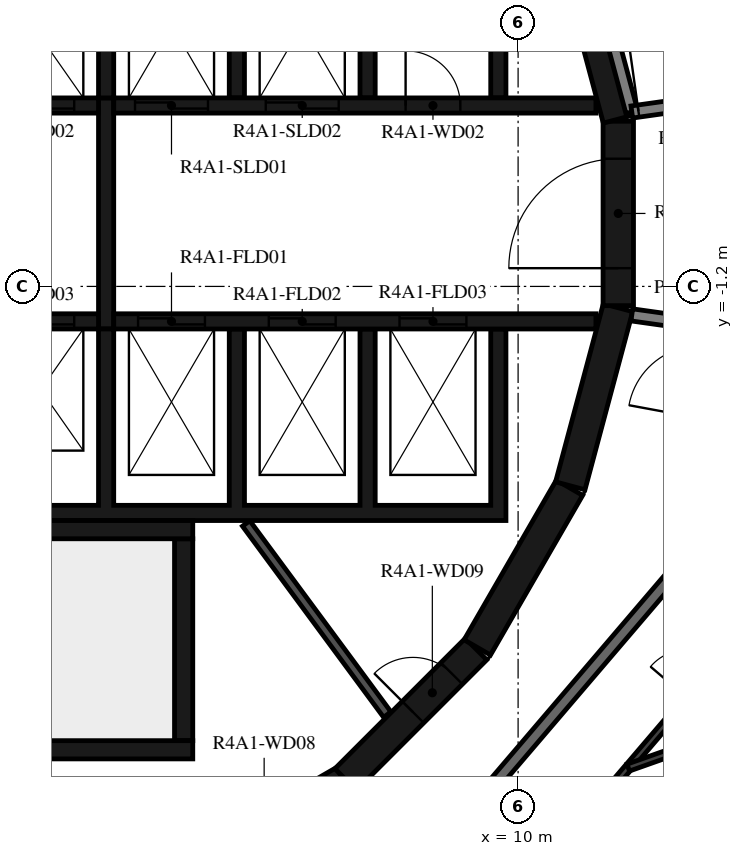
"""IFC4 building model, lengths in metres.
Left out: names, types, materials, properties, quantities, classifications, styles, units other than length and angle.
Written with IfcOpenShell. Run it as: python <this file> out.ifc"""

import sys

from ifc_helpers import new_model, si_unit, direction, frame, frame_2d, origin, place, context, subcontext, project, spatial, polyline, rectangle, outline, extrude, element, fill, save


model = new_model("IFC4")
c1 = context("Model", 3, precision=1e-05, world=origin(), true_north=direction((0.0, 1.0)))
c2 = subcontext(c1, "Body", "Model", "MODEL_VIEW")
j1 = project(units=[si_unit("LENGTHUNIT", "METRE"), si_unit("PLANEANGLEUNIT", "RADIAN")], contexts=[c1])
p1 = place(None, origin())
s1 = spatial("IfcSite", under=j1, at=p1, CompositionType="ELEMENT")
p2 = place(p1, origin())
s2 = spatial("IfcBuilding", under=s1, at=p2, CompositionType="ELEMENT")
p3 = place(p2, frame((0.0, 0.0, 155.2)))
s3 = spatial("IfcBuildingStorey", under=s2, at=p3, CompositionType="ELEMENT", Elevation=155.2)
p4 = place(p3, frame((4.51, -10.845, 0.0), z_axis=(0.0, 0.0, 1.0), x_axis=(0.865975092491, 0.500087131594, 0.0)))
e1 = element("IfcWall", 1, at=p4, inside=s3, PredefinedType="SHEAR", context=c2, shape_type="SweptSolid", body=[
    extrude(rectangle(XDim=3.033, YDim=0.5, at=frame_2d((1.516, 0.0))), origin(), (0.0, 0.0, 1.0), 3.12),
])
p5 = place(p4, frame((1.066, 0.0, 0.0)))
e2 = element("IfcOpeningElement", 2, at=p5, cuts=e1, PredefinedType="OPENING", context=c2, shape_type="SweptSolid", body=[
    extrude(rectangle(XDim=0.9, YDim=2.1, at=frame_2d((0.45, 1.05))), frame((0.0, 0.26, 0.0), z_axis=(0.0, -1.0, 0.0), x_axis=(1.0, 0.0, 0.0)), (0.0, 0.0, 1.0), 0.52),
])
p6 = place(p3, frame((7.164, -9.308, 0.0), z_axis=(0.0, 0.0, 1.0), x_axis=(0.707106781187, 0.707106781187, 0.0)))
e3 = element("IfcWall", 3, at=p6, inside=s3, PredefinedType="SHEAR", context=c2, shape_type="SweptSolid", body=[
    extrude(rectangle(XDim=3.032, YDim=0.5, at=frame_2d((1.516, 0.0))), origin(), (0.0, 0.0, 1.0), 3.12),
])
p7 = place(p6, frame((1.566, 0.0, 0.0)))
e4 = element("IfcOpeningElement", 4, at=p7, cuts=e3, PredefinedType="OPENING", context=c2, shape_type="SweptSolid", body=[
    extrude(rectangle(XDim=0.9, YDim=2.1, at=frame_2d((0.45, 1.05))), frame((0.0, 0.26, 0.0), z_axis=(0.0, -1.0, 0.0), x_axis=(1.0, 0.0, 0.0)), (0.0, 0.0, 1.0), 0.52),
])
for number, where, z_axis, x_axis in (
    (5, (9.329, -7.137, 0.0), (0.0, 0.0, 1.0), (0.5, 0.866, 0.0)),
    (6, (10.858, -4.479, 0.0), (0.0, 0.0, 1.0), (0.259, 0.966, 0.0)),
):
    element("IfcWall", number, at=place(p3, frame(where, z_axis=z_axis, x_axis=x_axis)), inside=s3, PredefinedType="SHEAR", context=c2, shape_type="SweptSolid", body=[
        extrude(rectangle(XDim=3.033, YDim=0.5, at=frame_2d((1.516, 0.0))), origin(), (0.0, 0.0, 1.0), 3.12),
    ])
p8 = place(p3, frame((11.647, -1.516, 0.0), z_axis=(0.0, 0.0, 1.0), x_axis=(0.0, 1.0, 0.0)))
e7 = element("IfcWall", 7, at=p8, inside=s3, PredefinedType="SHEAR", context=c2, shape_type="SweptSolid", body=[
    extrude(rectangle(XDim=3.033, YDim=0.5, at=frame_2d((1.516, 0.0))), origin(), (0.0, 0.0, 1.0), 3.12),
])
p9 = place(p8, frame((0.616, 0.0, 0.0)))
e8 = element("IfcOpeningElement", 8, at=p9, cuts=e7, PredefinedType="OPENING", context=c2, shape_type="SweptSolid", body=[
    extrude(rectangle(XDim=1.8, YDim=2.1, at=frame_2d((0.9, 1.05))), frame((0.0, 0.26, 0.0), z_axis=(0.0, -1.0, 0.0), x_axis=(1.0, 0.0, 0.0)), (0.0, 0.0, 1.0), 0.52),
])
p10 = place(p3, frame((11.643, 1.55, 0.0), z_axis=(0.0, 0.0, 1.0), x_axis=(-0.258734743916, 0.965948410781, 0.0)))
e9 = element("IfcWall", 9, at=p10, inside=s3, PredefinedType="SHEAR", context=c2, shape_type="SweptSolid", body=[
    extrude(rectangle(XDim=3.033, YDim=0.5, at=frame_2d((1.516, 0.0))), origin(), (0.0, 0.0, 1.0), 3.12),
])
p11 = place(p3, frame((-2.4, -5.2, 0.0), z_axis=(0.0, 0.0, 1.0), x_axis=(1.0, 0.0, 0.0)))
e10 = element("IfcWall", 10, at=p11, inside=s3, PredefinedType="SHEAR", context=c2, shape_type="SweptSolid", body=[
    extrude(rectangle(XDim=7.05, YDim=0.3, at=frame_2d((3.525, 0.0))), origin(), (0.0, 0.0, 1.0), 3.12),
])
p12 = place(p3, frame((4.5, -8.67, 0.0), z_axis=(0.0, 0.0, 1.0), x_axis=(0.0, 1.0, 0.0)))
e11 = element("IfcWall", 11, at=p12, inside=s3, PredefinedType="SHEAR", context=c2, shape_type="SweptSolid", body=[
    extrude(rectangle(XDim=3.32, YDim=0.3, at=frame_2d((1.66, 0.0))), origin(), (0.0, 0.0, 1.0), 3.12),
])
p13 = place(p3, frame((0.1, -8.82, 0.0), z_axis=(0.0, 0.0, 1.0), x_axis=(1.0, 0.0, 0.0)))
e12 = element("IfcWall", 12, at=p13, inside=s3, PredefinedType="SHEAR", context=c2, shape_type="SweptSolid", body=[
    extrude(rectangle(XDim=4.55, YDim=0.3, at=frame_2d((2.275, 0.0))), origin(), (0.0, 0.0, 1.0), 3.12),
])
p14 = place(p3, origin())
e13 = element("IfcWall", 13, at=p14, inside=s3, PredefinedType="SHEAR", context=c2, shape_type="SweptSolid", body=[
    extrude(outline(polyline([(-9.55, 4.8), (-1.2, 4.8), (-1.2, 1.9), (-0.95, 1.9), (-0.95, 4.8), (0.95, 4.8), (0.95, 1.9), (1.2, 1.9), (1.2, 4.8), (3.1, 4.8), (3.1, 1.9), (3.35, 1.9), (3.35, 4.8), (5.25, 4.8), (5.25, 1.9), (5.5, 1.9), (5.5, 4.8), (7.4, 4.8), (7.4, 1.9), (7.65, 1.9), (7.65, 4.8), (9.55, 4.8), (9.55, 1.9), (9.8, 1.9), (9.8, 4.8), (9.8, 5.05), (-9.8, 5.05), (-9.8, 4.8), (-9.8, 1.9), (-9.55, 1.9), (-9.55, 4.8)])), origin(), (0.0, 0.0, 1.0), 3.12),
])
p15 = place(p3, origin())
e14 = element("IfcWall", 14, at=p15, inside=s3, PredefinedType="SHEAR", context=c2, shape_type="SweptSolid", body=[
    extrude(outline(polyline([(9.8, -5.05), (9.8, -4.8), (9.8, -1.9), (9.55, -1.9), (9.55, -4.8), (7.65, -4.8), (7.65, -1.9), (7.4, -1.9), (7.4, -4.8), (5.5, -4.8), (5.5, -1.9), (5.25, -1.9), (5.25, -4.8), (3.35, -4.8), (3.35, -1.9), (3.1, -1.9), (3.1, -4.8), (1.2, -4.8), (1.2, -1.9), (0.95, -1.9), (0.95, -4.8), (-0.95, -4.8), (-0.95, -1.9), (-1.2, -1.9), (-1.2, -4.8), (-3.1, -4.8), (-3.1, -1.9), (-3.35, -1.9), (-3.35, -4.8), (-5.25, -4.8), (-5.25, -1.9), (-5.5, -1.9), (-5.5, -4.8), (-7.4, -4.8), (-7.4, -1.9), (-7.65, -1.9), (-7.65, -4.8), (-9.55, -4.8), (-9.55, -1.9), (-9.8, -1.9), (-9.8, -4.8), (-9.8, -5.05), (9.8, -5.05)])), origin(), (0.0, 0.0, 1.0), 3.12),
])
p16 = place(p3, frame((-11.28, 1.775, 0.0), z_axis=(0.0, 0.0, 1.0), x_axis=(1.0, 0.0, 0.0)))
e15 = element("IfcWall", 15, at=p16, inside=s3, PredefinedType="SHEAR", context=c2, shape_type="SweptSolid", body=[
    extrude(rectangle(XDim=14.38, YDim=0.25, at=frame_2d((7.19, 0.0))), origin(), (0.0, 0.0, 1.0), 3.12),
])
p17 = place(p16, frame((10.73, 0.0, 0.0)))
e16 = element("IfcOpeningElement", 16, at=p17, cuts=e15, PredefinedType="OPENING", context=c2, shape_type="SweptSolid", body=[
    extrude(rectangle(XDim=1.1, YDim=2.1, at=frame_2d((0.55, 1.05))), frame((0.0, 0.135, 0.0), z_axis=(0.0, -1.0, 0.0), x_axis=(1.0, 0.0, 0.0)), (0.0, 0.0, 1.0), 0.27),
])
p18 = place(p16, frame((12.88, 0.0, 0.0)))
e17 = element("IfcOpeningElement", 17, at=p18, cuts=e15, PredefinedType="OPENING", context=c2, shape_type="SweptSolid", body=[
    extrude(rectangle(XDim=1.1, YDim=2.1, at=frame_2d((0.55, 1.05))), frame((0.0, 0.135, 0.0), z_axis=(0.0, -1.0, 0.0), x_axis=(1.0, 0.0, 0.0)), (0.0, 0.0, 1.0), 0.27),
])
p19 = place(p16, frame((5.455, 0.0, 0.0)))
e18 = element("IfcOpeningElement", 18, at=p19, cuts=e15, PredefinedType="OPENING", context=c2, shape_type="SweptSolid", body=[
    extrude(rectangle(XDim=0.9, YDim=2.1, at=frame_2d((0.45, 1.05))), frame((0.0, 0.135, 0.0), z_axis=(0.0, -1.0, 0.0), x_axis=(1.0, 0.0, 0.0)), (0.0, 0.0, 1.0), 0.27),
])
p20 = place(p3, frame((3.35, 1.775, 0.0), z_axis=(0.0, 0.0, 1.0), x_axis=(1.0, 0.0, 0.0)))
e19 = element("IfcWall", 19, at=p20, inside=s3, PredefinedType="SHEAR", context=c2, shape_type="SweptSolid", body=[
    extrude(rectangle(XDim=7.93, YDim=0.25, at=frame_2d((3.965, 0.0))), origin(), (0.0, 0.0, 1.0), 3.12),
])
p21 = place(p20, frame((0.35, 0.0, 0.0)))
e20 = element("IfcOpeningElement", 20, at=p21, cuts=e19, PredefinedType="OPENING", context=c2, shape_type="SweptSolid", body=[
    extrude(rectangle(XDim=1.2, YDim=2.4, at=frame_2d((0.6, 1.2))), frame((0.0, 0.135, 0.0), z_axis=(0.0, -1.0, 0.0), x_axis=(1.0, 0.0, 0.0)), (0.0, 0.0, 1.0), 0.27),
])
p22 = place(p20, frame((2.5, 0.0, 0.0)))
e21 = element("IfcOpeningElement", 21, at=p22, cuts=e19, PredefinedType="OPENING", context=c2, shape_type="SweptSolid", body=[
    extrude(rectangle(XDim=1.2, YDim=2.4, at=frame_2d((0.6, 1.2))), frame((0.0, 0.135, 0.0), z_axis=(0.0, -1.0, 0.0), x_axis=(1.0, 0.0, 0.0)), (0.0, 0.0, 1.0), 0.27),
])
p23 = place(p20, frame((4.8, 0.0, 0.0)))
e22 = element("IfcOpeningElement", 22, at=p23, cuts=e19, PredefinedType="OPENING", context=c2, shape_type="SweptSolid", body=[
    extrude(rectangle(XDim=0.9, YDim=2.1, at=frame_2d((0.45, 1.05))), frame((0.0, 0.135, 0.0), z_axis=(0.0, -1.0, 0.0), x_axis=(1.0, 0.0, 0.0)), (0.0, 0.0, 1.0), 0.27),
])
p24 = place(p3, frame((-11.28, -1.775, 0.0), z_axis=(0.0, 0.0, 1.0), x_axis=(1.0, 0.0, 0.0)))
e23 = element("IfcWall", 23, at=p24, inside=s3, PredefinedType="SHEAR", context=c2, shape_type="SweptSolid", body=[
    extrude(rectangle(XDim=14.38, YDim=0.25, at=frame_2d((7.19, 0.0))), origin(), (0.0, 0.0, 1.0), 3.12),
])
p25 = place(p24, frame((12.88, 0.0, 0.0)))
e24 = element("IfcOpeningElement", 24, at=p25, cuts=e23, PredefinedType="OPENING", context=c2, shape_type="SweptSolid", body=[
    extrude(rectangle(XDim=1.1, YDim=2.1, at=frame_2d((0.55, 1.05))), frame((0.0, 0.135, 0.0), z_axis=(0.0, -1.0, 0.0), x_axis=(1.0, 0.0, 0.0)), (0.0, 0.0, 1.0), 0.27),
])
p26 = place(p24, frame((6.53, 0.0, 0.0)))
e25 = element("IfcOpeningElement", 25, at=p26, cuts=e23, PredefinedType="OPENING", context=c2, shape_type="SweptSolid", body=[
    extrude(rectangle(XDim=0.9, YDim=2.1, at=frame_2d((0.45, 1.05))), frame((0.0, 0.135, 0.0), z_axis=(0.0, -1.0, 0.0), x_axis=(1.0, 0.0, 0.0)), (0.0, 0.0, 1.0), 0.27),
])
p27 = place(p24, frame((8.68, 0.0, 0.0)))
e26 = element("IfcOpeningElement", 26, at=p27, cuts=e23, PredefinedType="OPENING", context=c2, shape_type="SweptSolid", body=[
    extrude(rectangle(XDim=0.9, YDim=2.1, at=frame_2d((0.45, 1.05))), frame((0.0, 0.135, 0.0), z_axis=(0.0, -1.0, 0.0), x_axis=(1.0, 0.0, 0.0)), (0.0, 0.0, 1.0), 0.27),
])
p28 = place(p24, frame((10.83, 0.0, 0.0)))
e27 = element("IfcOpeningElement", 27, at=p28, cuts=e23, PredefinedType="OPENING", context=c2, shape_type="SweptSolid", body=[
    extrude(rectangle(XDim=0.9, YDim=2.1, at=frame_2d((0.45, 1.05))), frame((0.0, 0.135, 0.0), z_axis=(0.0, -1.0, 0.0), x_axis=(1.0, 0.0, 0.0)), (0.0, 0.0, 1.0), 0.27),
])
p29 = place(p3, frame((3.35, -1.775, 0.0), z_axis=(0.0, 0.0, 1.0), x_axis=(1.0, 0.0, 0.0)))
e28 = element("IfcWall", 28, at=p29, inside=s3, PredefinedType="SHEAR", context=c2, shape_type="SweptSolid", body=[
    extrude(rectangle(XDim=7.93, YDim=0.25, at=frame_2d((3.965, 0.0))), origin(), (0.0, 0.0, 1.0), 3.12),
])
p30 = place(p29, frame((0.4, 0.0, 0.0)))
e29 = element("IfcOpeningElement", 29, at=p30, cuts=e28, PredefinedType="OPENING", context=c2, shape_type="SweptSolid", body=[
    extrude(rectangle(XDim=1.1, YDim=2.4, at=frame_2d((0.55, 1.2))), frame((0.0, 0.135, 0.0), z_axis=(0.0, -1.0, 0.0), x_axis=(1.0, 0.0, 0.0)), (0.0, 0.0, 1.0), 0.27),
])
p31 = place(p29, frame((2.55, 0.0, 0.0)))
e30 = element("IfcOpeningElement", 30, at=p31, cuts=e28, PredefinedType="OPENING", context=c2, shape_type="SweptSolid", body=[
    extrude(rectangle(XDim=1.1, YDim=2.4, at=frame_2d((0.55, 1.2))), frame((0.0, 0.135, 0.0), z_axis=(0.0, -1.0, 0.0), x_axis=(1.0, 0.0, 0.0)), (0.0, 0.0, 1.0), 0.27),
])
p32 = place(p29, frame((4.7, 0.0, 0.0)))
e31 = element("IfcOpeningElement", 31, at=p32, cuts=e28, PredefinedType="OPENING", context=c2, shape_type="SweptSolid", body=[
    extrude(rectangle(XDim=1.1, YDim=2.4, at=frame_2d((0.55, 1.2))), frame((0.0, 0.135, 0.0), z_axis=(0.0, -1.0, 0.0), x_axis=(1.0, 0.0, 0.0)), (0.0, 0.0, 1.0), 0.27),
])
p33 = place(p3, frame((3.225, -1.9, 0.0), z_axis=(0.0, 0.0, 1.0), x_axis=(0.0, 1.0, 0.0)))
e32 = element("IfcWall", 32, at=p33, inside=s3, PredefinedType="SHEAR", context=c2, shape_type="SweptSolid", body=[
    extrude(rectangle(XDim=3.8, YDim=0.25, at=frame_2d((1.9, 0.0))), origin(), (0.0, 0.0, 1.0), 3.12),
])
p34 = place(p3, frame((5.528, -5.098, 0.0), z_axis=(0.0, 0.0, 1.0), x_axis=(0.594034318069, -0.804439698769, 0.0)))
e33 = element("IfcWall", 33, at=p34, inside=s3, PredefinedType="PARTITIONING", context=c2, shape_type="SweptSolid", body=[
    extrude(rectangle(XDim=3.907, YDim=0.15, at=frame_2d((1.953, 0.0))), origin(), (0.0, 0.0, 1.0), 3.12),
])
p35 = place(p3, frame((11.87, 1.668, 0.0), z_axis=(0.0, 0.0, 1.0), x_axis=(-0.258836880648, 0.965921047093, 0.0)))
e34 = element("IfcWall", 34, at=p35, inside=s3, PredefinedType="STANDARD", context=c2, shape_type="SweptSolid", body=[
    extrude(rectangle(XDim=1.695, YDim=0.2, at=frame_2d((0.848, 0.0))), origin(), (0.0, 0.0, 1.0), 3.12),
])
p36 = place(p3, frame((11.87, 1.668, 0.0), z_axis=(0.0, 0.0, 1.0), x_axis=(0.990270910415, 0.139152879904, 0.0)))
e35 = element("IfcWall", 35, at=p36, inside=s3, PredefinedType="STANDARD", context=c2, shape_type="SweptSolid", body=[
    extrude(rectangle(XDim=1.688, YDim=0.2, at=frame_2d((0.844, 0.0))), origin(), (0.0, 0.0, 1.0), 3.12),
])
p37 = place(p36, frame((0.11, 0.0, 0.0)))
e36 = element("IfcOpeningElement", 36, at=p37, cuts=e35, PredefinedType="OPENING", context=c2, shape_type="SweptSolid", body=[
    extrude(rectangle(XDim=1.2, YDim=2.1, at=frame_2d((0.6, 1.05))), frame((0.0, 0.11, 0.0), z_axis=(0.0, -1.0, 0.0), x_axis=(1.0, 0.0, 0.0)), (0.0, 0.0, 1.0), 0.22),
])
p38 = place(p3, frame((13.542, 1.903, 0.0), z_axis=(0.0, 0.0, 1.0), x_axis=(-0.333808508206, 0.942640907159, 0.0)))
e37 = element("IfcWall", 37, at=p38, inside=s3, PredefinedType="STANDARD", context=c2, shape_type="SweptSolid", body=[
    extrude(rectangle(XDim=6.317, YDim=0.2, at=frame_2d((3.158, 0.0))), origin(), (0.0, 0.0, 1.0), 3.12),
])
p39 = place(p3, frame((13.282, -1.867, 0.0), z_axis=(0.0, 0.0, 1.0), x_axis=(-0.990265430288, 0.139191873241, 0.0)))
e38 = element("IfcWall", 38, at=p39, inside=s3, PredefinedType="STANDARD", context=c2, shape_type="SweptSolid", body=[
    extrude(rectangle(XDim=1.426, YDim=0.2, at=frame_2d((0.713, 0.0))), origin(), (0.0, 0.0, 1.0), 3.12),
])
p40 = place(p3, frame((7.858, -11.433, 0.0), z_axis=(0.0, 0.0, 1.0), x_axis=(0.649440801937, 0.760412154545, 0.0)))
e39 = element("IfcWall", 39, at=p40, inside=s3, PredefinedType="STANDARD", context=c2, shape_type="SweptSolid", body=[
    extrude(rectangle(XDim=7.181, YDim=0.2, at=frame_2d((3.59, 0.0))), origin(), (0.0, 0.0, 1.0), 3.12),
])
p41 = place(p3, frame((8.737, -12.713, 0.0), z_axis=(0.0, 0.0, 1.0), x_axis=(0.649430604754, 0.760420863476, 0.0)))
e40 = element("IfcWall", 40, at=p41, inside=s3, PredefinedType="PARTITIONING", context=c2, shape_type="SweptSolid", body=[
    extrude(rectangle(XDim=7.985, YDim=0.12, at=frame_2d((3.992, 0.0))), origin(), (0.0, 0.0, 1.0), 3.12),
])
p42 = place(p41, frame((0.2, 0.0, 0.0)))
e41 = element("IfcOpeningElement", 41, at=p42, cuts=e40, PredefinedType="OPENING", context=c2, shape_type="SweptSolid", body=[
    extrude(rectangle(XDim=0.9, YDim=2.1, at=frame_2d((0.45, 1.05))), frame((0.0, 0.07, 0.0), z_axis=(0.0, -1.0, 0.0), x_axis=(1.0, 0.0, 0.0)), (0.0, 0.0, 1.0), 0.14),
])
p43 = place(p41, frame((6.234, 0.0, 0.0)))
e42 = element("IfcOpeningElement", 42, at=p43, cuts=e40, PredefinedType="OPENING", context=c2, shape_type="SweptSolid", body=[
    extrude(rectangle(XDim=0.8, YDim=2.1, at=frame_2d((0.4, 1.05))), frame((0.0, 0.07, 0.0), z_axis=(0.0, -1.0, 0.0), x_axis=(1.0, 0.0, 0.0)), (0.0, 0.0, 1.0), 0.14),
])
p44 = place(p3, frame((17.198, -7.206, 0.0), z_axis=(0.0, 0.0, 1.0), x_axis=(-0.942639551003, -0.333812337826, 0.0)))
e43 = element("IfcWall", 43, at=p44, inside=s3, PredefinedType="PARTITIONING", context=c2, shape_type="SweptSolid", body=[
    extrude(rectangle(XDim=5.713, YDim=0.12, at=frame_2d((2.857, 0.0))), origin(), (0.0, 0.0, 1.0), 3.12),
])
p45 = place(p9, origin())
e44 = element("IfcDoor", 44, at=p45, inside=s3, OperationType="DOUBLE_DOOR_SINGLE_SWING", PredefinedType="DOOR", context=c2, shape_type="SweptSolid", body=[
    extrude(rectangle(XDim=1.8, YDim=2.1, at=frame_2d((0.9, 1.05))), frame((0.0, 0.025, 0.0), z_axis=(0.0, -1.0, 0.0), x_axis=(1.0, 0.0, 0.0)), (0.0, 0.0, 1.0), 0.05),
])
fill(e8, e44)
p46 = place(p18, origin())
e45 = element("IfcDoor", 45, at=p46, inside=s3, OperationType="DOUBLE_DOOR_SLIDING", PredefinedType="DOOR", context=c2, shape_type="SweptSolid", body=[
    extrude(rectangle(XDim=1.1, YDim=2.1, at=frame_2d((0.55, 1.05))), frame((0.0, 0.025, 0.0), z_axis=(0.0, -1.0, 0.0), x_axis=(1.0, 0.0, 0.0)), (0.0, 0.0, 1.0), 0.05),
])
fill(e17, e45)
p47 = place(p21, origin())
e46 = element("IfcDoor", 46, at=p47, inside=s3, OperationType="DOUBLE_DOOR_SLIDING", PredefinedType="DOOR", context=c2, shape_type="SweptSolid", body=[
    extrude(rectangle(XDim=1.2, YDim=2.4, at=frame_2d((0.6, 1.2))), frame((0.0, 0.025, 0.0), z_axis=(0.0, -1.0, 0.0), x_axis=(1.0, 0.0, 0.0)), (0.0, 0.0, 1.0), 0.05),
])
fill(e20, e46)
p48 = place(p22, origin())
e47 = element("IfcDoor", 47, at=p48, inside=s3, OperationType="DOUBLE_DOOR_SLIDING", PredefinedType="DOOR", context=c2, shape_type="SweptSolid", body=[
    extrude(rectangle(XDim=1.2, YDim=2.4, at=frame_2d((0.6, 1.2))), frame((0.0, 0.025, 0.0), z_axis=(0.0, -1.0, 0.0), x_axis=(1.0, 0.0, 0.0)), (0.0, 0.0, 1.0), 0.05),
])
fill(e21, e47)
p49 = place(p25, origin())
e48 = element("IfcDoor", 48, at=p49, inside=s3, OperationType="DOUBLE_DOOR_SLIDING", PredefinedType="DOOR", context=c2, shape_type="SweptSolid", body=[
    extrude(rectangle(XDim=1.1, YDim=2.1, at=frame_2d((0.55, 1.05))), frame((0.0, 0.025, 0.0), z_axis=(0.0, -1.0, 0.0), x_axis=(1.0, 0.0, 0.0)), (0.0, 0.0, 1.0), 0.05),
])
fill(e24, e48)
p50 = place(p30, origin())
e49 = element("IfcDoor", 49, at=p50, inside=s3, OperationType="DOUBLE_DOOR_SLIDING", PredefinedType="DOOR", context=c2, shape_type="SweptSolid", body=[
    extrude(rectangle(XDim=1.1, YDim=2.4, at=frame_2d((0.55, 1.2))), frame((0.0, 0.025, 0.0), z_axis=(0.0, -1.0, 0.0), x_axis=(1.0, 0.0, 0.0)), (0.0, 0.0, 1.0), 0.05),
])
fill(e29, e49)
p51 = place(p31, origin())
e50 = element("IfcDoor", 50, at=p51, inside=s3, OperationType="DOUBLE_DOOR_SLIDING", PredefinedType="DOOR", context=c2, shape_type="SweptSolid", body=[
    extrude(rectangle(XDim=1.1, YDim=2.4, at=frame_2d((0.55, 1.2))), frame((0.0, 0.025, 0.0), z_axis=(0.0, -1.0, 0.0), x_axis=(1.0, 0.0, 0.0)), (0.0, 0.0, 1.0), 0.05),
])
fill(e30, e50)
p52 = place(p32, origin())
e51 = element("IfcDoor", 51, at=p52, inside=s3, OperationType="DOUBLE_DOOR_SLIDING", PredefinedType="DOOR", context=c2, shape_type="SweptSolid", body=[
    extrude(rectangle(XDim=1.1, YDim=2.4, at=frame_2d((0.55, 1.2))), frame((0.0, 0.025, 0.0), z_axis=(0.0, -1.0, 0.0), x_axis=(1.0, 0.0, 0.0)), (0.0, 0.0, 1.0), 0.05),
])
fill(e31, e51)
p53 = place(p23, origin())
e52 = element("IfcDoor", 52, at=p53, inside=s3, OperationType="SINGLE_SWING_RIGHT", PredefinedType="DOOR", context=c2, shape_type="SweptSolid", body=[
    extrude(rectangle(XDim=0.9, YDim=2.1, at=frame_2d((0.45, 1.05))), frame((0.0, 0.025, 0.0), z_axis=(0.0, -1.0, 0.0), x_axis=(1.0, 0.0, 0.0)), (0.0, 0.0, 1.0), 0.05),
])
fill(e22, e52)
p54 = place(p7, origin())
e53 = element("IfcDoor", 53, at=p54, inside=s3, OperationType="SINGLE_SWING_LEFT", PredefinedType="DOOR", context=c2, shape_type="SweptSolid", body=[
    extrude(rectangle(XDim=0.9, YDim=2.1, at=frame_2d((0.45, 1.05))), frame((0.0, 0.025, 0.0), z_axis=(0.0, -1.0, 0.0), x_axis=(1.0, 0.0, 0.0)), (0.0, 0.0, 1.0), 0.05),
])
fill(e4, e53)
p55 = place(p37, origin())
e54 = element("IfcDoor", 54, at=p55, inside=s3, OperationType="DOUBLE_DOOR_SINGLE_SWING", PredefinedType="DOOR", context=c2, shape_type="SweptSolid", body=[
    extrude(rectangle(XDim=1.2, YDim=2.1, at=frame_2d((0.6, 1.05))), frame((0.0, 0.025, 0.0), z_axis=(0.0, -1.0, 0.0), x_axis=(1.0, 0.0, 0.0)), (0.0, 0.0, 1.0), 0.05),
])
fill(e36, e54)
save(model, sys.argv[1])
